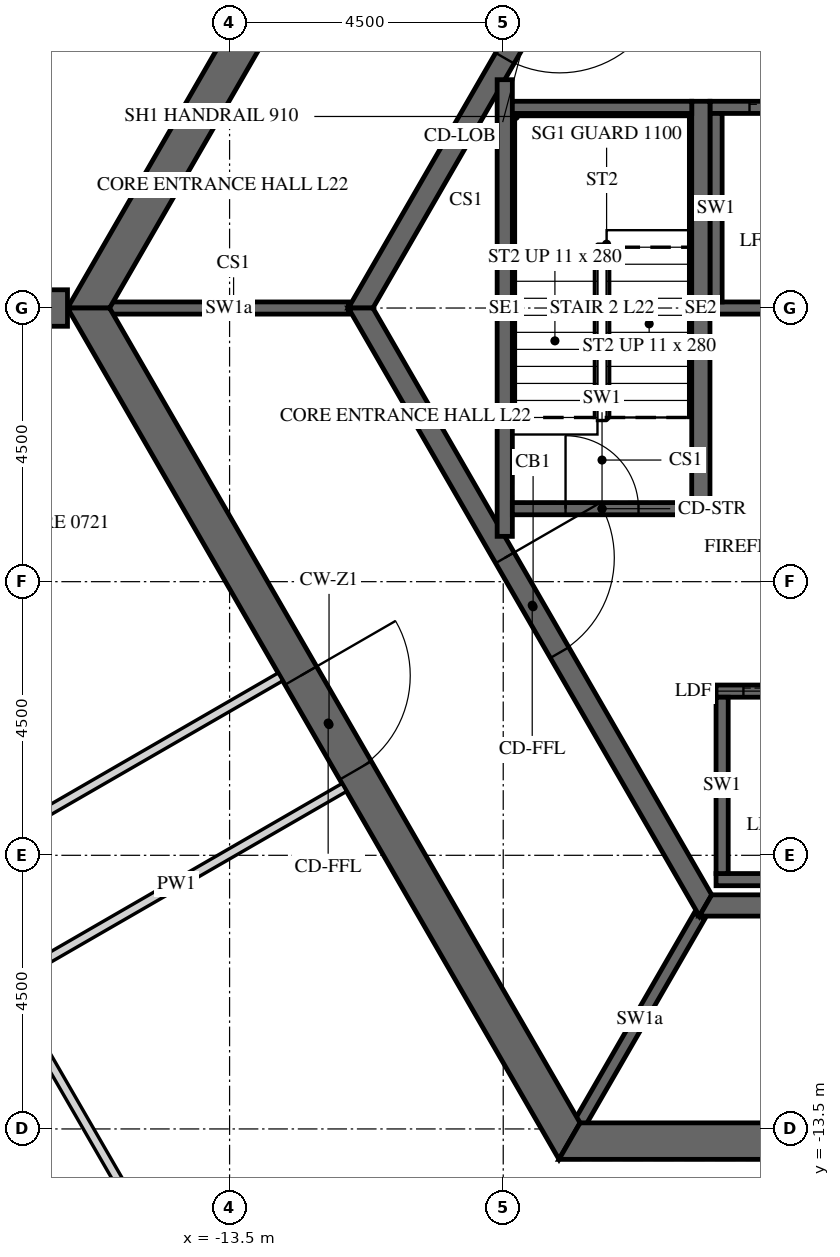
"""IFC4 building model, lengths in metres.
Left out: names, types, materials, properties, quantities, classifications, styles, units other than length and angle.
Written with IfcOpenShell. Run it as: python <this file> out.ifc"""

import sys

from ifc_helpers import new_model, si_unit, direction, frame, frame_2d, origin, place, context, subcontext, project, spatial, polyline, rectangle, outline, extrude, element, fill, save


model = new_model("IFC4")
c1 = context("Model", 3, precision=1e-05, world=origin(), true_north=direction((0.0, 1.0)))
c2 = subcontext(c1, "Body", "Model", "MODEL_VIEW")
j1 = project(units=[si_unit("LENGTHUNIT", "METRE"), si_unit("PLANEANGLEUNIT", "RADIAN")], contexts=[c1])
p1 = place(None, origin())
s1 = spatial("IfcSite", under=j1, at=p1, CompositionType="ELEMENT")
p2 = place(p1, origin())
s2 = spatial("IfcBuilding", under=s1, at=p2, CompositionType="ELEMENT")
p3 = place(p2, frame((0.0, 0.0, 99.9)))
s3 = spatial("IfcBuildingStorey", under=s2, at=p3, CompositionType="ELEMENT", Elevation=99.9)
p4 = place(p3, frame((-7.91, 13.7, -0.15), z_axis=(0.0, 0.0, 1.0), x_axis=(-0.499999880136, -0.866025472988, 0.0)))
e1 = element("IfcWall", 1, at=p4, inside=s3, PredefinedType="SHEAR", context=c2, shape_type="SweptSolid", body=[
    extrude(outline(polyline([(-0.173, -0.3), (15.993, -0.3), (15.646, 0.3), (0.173, 0.3), (-0.173, -0.3)])), origin(), (0.0, 0.0, 1.0), 3.9),
])
p5 = place(p4, frame((7.039, 0.0, 0.15)))
e2 = element("IfcOpeningElement", 2, at=p5, cuts=e1, PredefinedType="OPENING", context=c2, shape_type="SweptSolid", body=[
    extrude(rectangle(XDim=1.8, YDim=2.4, at=frame_2d((0.9, 1.2))), frame((0.0, 0.31, 0.0), z_axis=(0.0, -1.0, 0.0), x_axis=(1.0, 0.0, 0.0)), (0.0, 0.0, 1.0), 0.62),
])
p6 = place(p3, frame((-15.819, 0.0, -0.15), z_axis=(0.0, 0.0, 1.0), x_axis=(0.499999880136, -0.866025472988, 0.0)))
e3 = element("IfcWall", 3, at=p6, inside=s3, PredefinedType="SHEAR", context=c2, shape_type="SweptSolid", body=[
    extrude(outline(polyline([(-0.173, -0.3), (15.993, -0.3), (15.646, 0.3), (0.173, 0.3), (-0.173, -0.3)])), origin(), (0.0, 0.0, 1.0), 3.9),
])
p7 = place(p6, frame((6.981, 0.0, 0.15)))
e4 = element("IfcOpeningElement", 4, at=p7, cuts=e3, PredefinedType="OPENING", context=c2, shape_type="SweptSolid", body=[
    extrude(rectangle(XDim=1.8, YDim=2.4, at=frame_2d((0.9, 1.2))), frame((0.0, 0.31, 0.0), z_axis=(0.0, -1.0, 0.0), x_axis=(1.0, 0.0, 0.0)), (0.0, 0.0, 1.0), 0.62),
])
p8 = place(p3, frame((-7.91, -13.7, -0.15), z_axis=(0.0, 0.0, 1.0), x_axis=(1.0, 0.0, 0.0)))
e5 = element("IfcWall", 5, at=p8, inside=s3, PredefinedType="SHEAR", context=c2, shape_type="SweptSolid", body=[
    extrude(outline(polyline([(-0.173, -0.3), (15.993, -0.3), (15.646, 0.3), (0.173, 0.3), (-0.173, -0.3)])), origin(), (0.0, 0.0, 1.0), 3.9),
])
p9 = place(p8, frame((7.31, 0.0, 0.15)))
e6 = element("IfcOpeningElement", 6, at=p9, cuts=e5, PredefinedType="OPENING", context=c2, shape_type="SweptSolid", body=[
    extrude(rectangle(XDim=1.2, YDim=2.4, at=frame_2d((0.6, 1.2))), frame((0.0, 0.31, 0.0), z_axis=(0.0, -1.0, 0.0), x_axis=(1.0, 0.0, 0.0)), (0.0, 0.0, 1.0), 0.62),
])
p10 = place(p3, frame((-16.166, 0.0, -0.15), z_axis=(0.0, 0.0, 1.0), x_axis=(-1.0, 0.0, 0.0)))
e7 = element("IfcWall", 7, at=p10, inside=s3, PredefinedType="SHEAR", context=c2, shape_type="SweptSolid", body=[
    extrude(rectangle(XDim=16.509, YDim=0.6, at=frame_2d((8.254, 0.0))), origin(), (0.0, 0.0, 1.0), 3.9),
])
p11 = place(p10, frame((7.354, 0.0, 0.15)))
e8 = element("IfcOpeningElement", 8, at=p11, cuts=e7, PredefinedType="OPENING", context=c2, shape_type="SweptSolid", body=[
    extrude(rectangle(XDim=1.8, YDim=2.4, at=frame_2d((0.9, 1.2))), frame((0.0, 0.31, 0.0), z_axis=(0.0, -1.0, 0.0), x_axis=(1.0, 0.0, 0.0)), (0.0, 0.0, 1.0), 0.62),
])
p12 = place(p3, frame((-5.673, 9.825, -0.15), z_axis=(0.0, 0.0, 1.0), x_axis=(-0.499995046907, -0.866028263435, 0.0)))
e9 = element("IfcWall", 9, at=p12, inside=s3, PredefinedType="SHEAR", context=c2, shape_type="SweptSolid", body=[
    extrude(outline(polyline([(-0.101, -0.175), (11.446, -0.175), (11.244, 0.175), (0.101, 0.175), (-0.101, -0.175)])), origin(), (0.0, 0.0, 1.0), 3.9),
])
p13 = place(p12, frame((4.801, 0.0, 0.15)))
e10 = element("IfcOpeningElement", 10, at=p13, cuts=e9, PredefinedType="OPENING", context=c2, shape_type="SweptSolid", body=[
    extrude(rectangle(XDim=1.8, YDim=2.4, at=frame_2d((0.9, 1.2))), frame((0.0, 0.185, 0.0), z_axis=(0.0, -1.0, 0.0), x_axis=(1.0, 0.0, 0.0)), (0.0, 0.0, 1.0), 0.37),
])
p14 = place(p3, frame((-11.345, 0.0, -0.15), z_axis=(0.0, 0.0, 1.0), x_axis=(0.499995046907, -0.866028263435, 0.0)))
e11 = element("IfcWall", 11, at=p14, inside=s3, PredefinedType="SHEAR", context=c2, shape_type="SweptSolid", body=[
    extrude(outline(polyline([(-0.101, -0.175), (11.446, -0.175), (11.244, 0.175), (0.101, 0.175), (-0.101, -0.175)])), origin(), (0.0, 0.0, 1.0), 3.9),
])
p15 = place(p14, frame((4.744, 0.0, 0.15)))
e12 = element("IfcOpeningElement", 12, at=p15, cuts=e11, PredefinedType="OPENING", context=c2, shape_type="SweptSolid", body=[
    extrude(rectangle(XDim=1.8, YDim=2.4, at=frame_2d((0.9, 1.2))), frame((0.0, 0.185, 0.0), z_axis=(0.0, -1.0, 0.0), x_axis=(1.0, 0.0, 0.0)), (0.0, 0.0, 1.0), 0.37),
])
p16 = place(p3, frame((-5.673, -9.825, -0.15), z_axis=(0.0, 0.0, 1.0), x_axis=(1.0, 0.0, 0.0)))
e13 = element("IfcWall", 13, at=p16, inside=s3, PredefinedType="SHEAR", context=c2, shape_type="SweptSolid", body=[
    extrude(outline(polyline([(-0.101, -0.175), (11.446, -0.175), (11.244, 0.175), (0.101, 0.175), (-0.101, -0.175)])), origin(), (0.0, 0.0, 1.0), 3.9),
])
p17 = place(p3, frame((-5.6, 3.3, -0.25), z_axis=(0.0, 0.0, 1.0), x_axis=(1.0, 0.0, 0.0)))
e14 = element("IfcWall", 14, at=p17, inside=s3, PredefinedType="SHEAR", context=c2, shape_type="SweptSolid", body=[
    extrude(rectangle(XDim=11.2, YDim=0.2, at=frame_2d((5.6, 0.0))), origin(), (0.0, 0.0, 1.0), 3.9),
])
p18 = place(p17, frame((0.65, 0.0, 0.25)))
e15 = element("IfcOpeningElement", 15, at=p18, cuts=e14, PredefinedType="OPENING", context=c2, shape_type="SweptSolid", body=[
    extrude(rectangle(XDim=1.1, YDim=2.1, at=frame_2d((0.55, 1.05))), frame((0.0, 0.11, 0.0), z_axis=(0.0, -1.0, 0.0), x_axis=(1.0, 0.0, 0.0)), (0.0, 0.0, 1.0), 0.22),
])
p19 = place(p17, frame((2.85, 0.0, 0.25)))
e16 = element("IfcOpeningElement", 16, at=p19, cuts=e14, PredefinedType="OPENING", context=c2, shape_type="SweptSolid", body=[
    extrude(rectangle(XDim=1.1, YDim=2.1, at=frame_2d((0.55, 1.05))), frame((0.0, 0.11, 0.0), z_axis=(0.0, -1.0, 0.0), x_axis=(1.0, 0.0, 0.0)), (0.0, 0.0, 1.0), 0.22),
])
p20 = place(p17, frame((5.05, 0.0, 0.25)))
e17 = element("IfcOpeningElement", 17, at=p20, cuts=e14, PredefinedType="OPENING", context=c2, shape_type="SweptSolid", body=[
    extrude(rectangle(XDim=1.1, YDim=2.1, at=frame_2d((0.55, 1.05))), frame((0.0, 0.11, 0.0), z_axis=(0.0, -1.0, 0.0), x_axis=(1.0, 0.0, 0.0)), (0.0, 0.0, 1.0), 0.22),
])
p21 = place(p17, frame((7.25, 0.0, 0.25)))
e18 = element("IfcOpeningElement", 18, at=p21, cuts=e14, PredefinedType="OPENING", context=c2, shape_type="SweptSolid", body=[
    extrude(rectangle(XDim=1.1, YDim=2.1, at=frame_2d((0.55, 1.05))), frame((0.0, 0.11, 0.0), z_axis=(0.0, -1.0, 0.0), x_axis=(1.0, 0.0, 0.0)), (0.0, 0.0, 1.0), 0.22),
])
p22 = place(p17, frame((9.45, 0.0, 0.25)))
e19 = element("IfcOpeningElement", 19, at=p22, cuts=e14, PredefinedType="OPENING", context=c2, shape_type="SweptSolid", body=[
    extrude(rectangle(XDim=1.1, YDim=2.1, at=frame_2d((0.55, 1.05))), frame((0.0, 0.11, 0.0), z_axis=(0.0, -1.0, 0.0), x_axis=(1.0, 0.0, 0.0)), (0.0, 0.0, 1.0), 0.22),
])
p23 = place(p3, frame((-5.6, 0.0, -0.25), z_axis=(0.0, 0.0, 1.0), x_axis=(1.0, 0.0, 0.0)))
e20 = element("IfcWall", 20, at=p23, inside=s3, PredefinedType="SHEAR", context=c2, shape_type="SweptSolid", body=[
    extrude(rectangle(XDim=11.2, YDim=0.2, at=frame_2d((5.6, 0.0))), origin(), (0.0, 0.0, 1.0), 3.9),
])
p24 = place(p3, frame((-5.5, 0.1, -0.25), z_axis=(0.0, 0.0, 1.0), x_axis=(0.0, 1.0, 0.0)))
e21 = element("IfcWall", 21, at=p24, inside=s3, PredefinedType="SHEAR", context=c2, shape_type="SweptSolid", body=[
    extrude(rectangle(XDim=3.1, YDim=0.2, at=frame_2d((1.55, 0.0))), origin(), (0.0, 0.0, 1.0), 3.9),
])
p25 = place(p3, frame((-5.5, -6.3, -0.25), z_axis=(0.0, 0.0, 1.0), x_axis=(1.0, 0.0, 0.0)))
e22 = element("IfcWall", 22, at=p25, inside=s3, PredefinedType="SHEAR", context=c2, shape_type="SweptSolid", body=[
    extrude(rectangle(XDim=9.2, YDim=0.2, at=frame_2d((4.6, 0.0))), origin(), (0.0, 0.0, 1.0), 3.9),
])
p26 = place(p25, frame((0.45, 0.0, 0.25)))
e23 = element("IfcOpeningElement", 23, at=p26, cuts=e22, PredefinedType="OPENING", context=c2, shape_type="SweptSolid", body=[
    extrude(rectangle(XDim=1.1, YDim=2.1, at=frame_2d((0.55, 1.05))), frame((0.0, 0.11, 0.0), z_axis=(0.0, -1.0, 0.0), x_axis=(1.0, 0.0, 0.0)), (0.0, 0.0, 1.0), 0.22),
])
p27 = place(p25, frame((2.25, 0.0, 0.25)))
e24 = element("IfcOpeningElement", 24, at=p27, cuts=e22, PredefinedType="OPENING", context=c2, shape_type="SweptSolid", body=[
    extrude(rectangle(XDim=1.1, YDim=2.1, at=frame_2d((0.55, 1.05))), frame((0.0, 0.11, 0.0), z_axis=(0.0, -1.0, 0.0), x_axis=(1.0, 0.0, 0.0)), (0.0, 0.0, 1.0), 0.22),
])
p28 = place(p25, frame((4.05, 0.0, 0.25)))
e25 = element("IfcOpeningElement", 25, at=p28, cuts=e22, PredefinedType="OPENING", context=c2, shape_type="SweptSolid", body=[
    extrude(rectangle(XDim=1.1, YDim=2.1, at=frame_2d((0.55, 1.05))), frame((0.0, 0.11, 0.0), z_axis=(0.0, -1.0, 0.0), x_axis=(1.0, 0.0, 0.0)), (0.0, 0.0, 1.0), 0.22),
])
p29 = place(p25, frame((5.85, 0.0, 0.25)))
e26 = element("IfcOpeningElement", 26, at=p29, cuts=e22, PredefinedType="OPENING", context=c2, shape_type="SweptSolid", body=[
    extrude(rectangle(XDim=1.1, YDim=2.1, at=frame_2d((0.55, 1.05))), frame((0.0, 0.11, 0.0), z_axis=(0.0, -1.0, 0.0), x_axis=(1.0, 0.0, 0.0)), (0.0, 0.0, 1.0), 0.22),
])
p30 = place(p25, frame((7.65, 0.0, 0.25)))
e27 = element("IfcOpeningElement", 27, at=p30, cuts=e22, PredefinedType="OPENING", context=c2, shape_type="SweptSolid", body=[
    extrude(rectangle(XDim=1.1, YDim=2.1, at=frame_2d((0.55, 1.05))), frame((0.0, 0.11, 0.0), z_axis=(0.0, -1.0, 0.0), x_axis=(1.0, 0.0, 0.0)), (0.0, 0.0, 1.0), 0.22),
])
p31 = place(p3, frame((-5.5, -9.4, -0.25), z_axis=(0.0, 0.0, 1.0), x_axis=(1.0, 0.0, 0.0)))
e28 = element("IfcWall", 28, at=p31, inside=s3, PredefinedType="SHEAR", context=c2, shape_type="SweptSolid", body=[
    extrude(rectangle(XDim=9.2, YDim=0.2, at=frame_2d((4.6, 0.0))), origin(), (0.0, 0.0, 1.0), 3.9),
])
p32 = place(p3, frame((-5.4, -9.3, -0.25), z_axis=(0.0, 0.0, 1.0), x_axis=(0.0, 1.0, 0.0)))
e29 = element("IfcWall", 29, at=p32, inside=s3, PredefinedType="SHEAR", context=c2, shape_type="SweptSolid", body=[
    extrude(rectangle(XDim=2.9, YDim=0.2, at=frame_2d((1.45, 0.0))), origin(), (0.0, 0.0, 1.0), 3.9),
])
p33 = place(p3, frame((-11.547, 0.0, -0.15), z_axis=(0.0, 0.0, 1.0), x_axis=(-1.0, 0.0, 0.0)))
e30 = element("IfcWall", 30, at=p33, inside=s3, PredefinedType="SHEAR", context=c2, shape_type="SweptSolid", body=[
    extrude(rectangle(XDim=3.926, YDim=0.2, at=frame_2d((1.963, 0.0))), origin(), (0.0, 0.0, 1.0), 3.9),
])
p34 = place(p3, frame((-5.773, -10.0, -0.15), z_axis=(0.0, 0.0, 1.0), x_axis=(-0.500038251005, -0.86600331843, 0.0)))
e31 = element("IfcWall", 31, at=p34, inside=s3, PredefinedType="SHEAR", context=c2, shape_type="SweptSolid", body=[
    extrude(rectangle(XDim=3.926, YDim=0.2, at=frame_2d((1.963, 0.0))), origin(), (0.0, 0.0, 1.0), 3.9),
])
p35 = place(p3, frame((-5.75, -3.4, -0.25), z_axis=(0.0, 0.0, 1.0), x_axis=(0.0, 1.0, 0.0)))
e32 = element("IfcWall", 32, at=p35, inside=s3, PredefinedType="SHEAR", context=c2, shape_type="SweptSolid", body=[
    extrude(rectangle(XDim=6.8, YDim=0.3, at=frame_2d((3.4, 0.0))), origin(), (0.0, 0.0, 1.0), 3.9),
])
p36 = place(p3, frame((-8.975, -3.755, -0.25), z_axis=(0.0, 0.0, 1.0), x_axis=(0.0, 1.0, 0.0)))
e33 = element("IfcWall", 33, at=p36, inside=s3, PredefinedType="SHEAR", context=c2, shape_type="SweptSolid", body=[
    extrude(rectangle(XDim=7.51, YDim=0.25, at=frame_2d((3.755, 0.0))), origin(), (0.0, 0.0, 1.0), 3.9),
])
p37 = place(p3, frame((-8.85, 3.3, -0.25), z_axis=(0.0, 0.0, 1.0), x_axis=(1.0, 0.0, 0.0)))
e34 = element("IfcWall", 34, at=p37, inside=s3, PredefinedType="SHEAR", context=c2, shape_type="SweptSolid", body=[
    extrude(rectangle(XDim=2.95, YDim=0.2, at=frame_2d((1.475, 0.0))), origin(), (0.0, 0.0, 1.0), 3.9),
])
p38 = place(p3, frame((-8.85, -3.3, -0.25), z_axis=(0.0, 0.0, 1.0), x_axis=(1.0, 0.0, 0.0)))
e35 = element("IfcWall", 35, at=p38, inside=s3, PredefinedType="SHEAR", context=c2, shape_type="SweptSolid", body=[
    extrude(rectangle(XDim=2.95, YDim=0.2, at=frame_2d((1.475, 0.0))), origin(), (0.0, 0.0, 1.0), 3.9),
])
p39 = place(p38, frame((0.875, 0.0, 0.25)))
e36 = element("IfcOpeningElement", 36, at=p39, cuts=e35, PredefinedType="OPENING", context=c2, shape_type="SweptSolid", body=[
    extrude(rectangle(XDim=1.2, YDim=2.4, at=frame_2d((0.6, 1.2))), frame((0.0, 0.11, 0.0), z_axis=(0.0, -1.0, 0.0), x_axis=(1.0, 0.0, 0.0)), (0.0, 0.0, 1.0), 0.22),
])
p40 = place(p3, frame((-13.94, 22.175, 0.0), z_axis=(0.0, 0.0, 1.0), x_axis=(-0.438373022655, -0.898793131376, 0.0)))
e37 = element("IfcWall", 37, at=p40, inside=s3, PredefinedType="PARTITIONING", context=c2, shape_type="SweptSolid", body=[
    extrude(rectangle(XDim=22.335, YDim=0.15, at=frame_2d((11.168, 0.0))), origin(), (0.0, 0.0, 1.0), 2.988),
])
p41 = place(p40, frame((3.363, 0.0, 0.0)))
e38 = element("IfcOpeningElement", 38, at=p41, cuts=e37, PredefinedType="OPENING", context=c2, shape_type="SweptSolid", body=[
    extrude(rectangle(XDim=1.0, YDim=2.1, at=frame_2d((0.5, 1.05))), frame((0.0, 0.085, 0.0), z_axis=(0.0, -1.0, 0.0), x_axis=(1.0, 0.0, 0.0)), (0.0, 0.0, 1.0), 0.17),
])
p42 = place(p40, frame((11.609, 0.0, 0.0)))
e39 = element("IfcOpeningElement", 39, at=p42, cuts=e37, PredefinedType="OPENING", context=c2, shape_type="SweptSolid", body=[
    extrude(rectangle(XDim=1.0, YDim=2.1, at=frame_2d((0.5, 1.05))), frame((0.0, 0.085, 0.0), z_axis=(0.0, -1.0, 0.0), x_axis=(1.0, 0.0, 0.0)), (0.0, 0.0, 1.0), 0.17),
])
p43 = place(p40, frame((19.872, 0.0, 0.0)))
e40 = element("IfcOpeningElement", 40, at=p43, cuts=e37, PredefinedType="OPENING", context=c2, shape_type="SweptSolid", body=[
    extrude(rectangle(XDim=1.0, YDim=2.1, at=frame_2d((0.5, 1.05))), frame((0.0, 0.085, 0.0), z_axis=(0.0, -1.0, 0.0), x_axis=(1.0, 0.0, 0.0)), (0.0, 0.0, 1.0), 0.17),
])
p44 = place(p3, frame((-24.436, -2.175, 0.0), z_axis=(0.0, 0.0, 1.0), x_axis=(0.499996816197, -0.866027241946, 0.0)))
e41 = element("IfcWall", 41, at=p44, inside=s3, PredefinedType="PARTITIONING", context=c2, shape_type="SweptSolid", body=[
    extrude(rectangle(XDim=24.238, YDim=0.15, at=frame_2d((12.119, 0.0))), origin(), (0.0, 0.0, 1.0), 2.988),
])
p45 = place(p44, frame((0.179, 0.0, 0.0)))
e42 = element("IfcOpeningElement", 42, at=p45, cuts=e41, PredefinedType="OPENING", context=c2, shape_type="SweptSolid", body=[
    extrude(rectangle(XDim=1.0, YDim=2.1, at=frame_2d((0.5, 1.05))), frame((0.0, 0.085, 0.0), z_axis=(0.0, -1.0, 0.0), x_axis=(1.0, 0.0, 0.0)), (0.0, 0.0, 1.0), 0.17),
])
p46 = place(p44, frame((12.246, 0.0, 0.0)))
e43 = element("IfcOpeningElement", 43, at=p46, cuts=e41, PredefinedType="OPENING", context=c2, shape_type="SweptSolid", body=[
    extrude(rectangle(XDim=1.0, YDim=2.1, at=frame_2d((0.5, 1.05))), frame((0.0, 0.085, 0.0), z_axis=(0.0, -1.0, 0.0), x_axis=(1.0, 0.0, 0.0)), (0.0, 0.0, 1.0), 0.17),
])
p47 = place(p44, frame((19.792, 0.0, 0.0)))
e44 = element("IfcOpeningElement", 44, at=p47, cuts=e41, PredefinedType="OPENING", context=c2, shape_type="SweptSolid", body=[
    extrude(rectangle(XDim=1.0, YDim=2.1, at=frame_2d((0.5, 1.05))), frame((0.0, 0.085, 0.0), z_axis=(0.0, -1.0, 0.0), x_axis=(1.0, 0.0, 0.0)), (0.0, 0.0, 1.0), 0.17),
])
p48 = place(p3, frame((-12.664, -6.066, 0.0), z_axis=(0.0, 0.0, 1.0), x_axis=(-0.866021702275, -0.500006411147, 0.0)))
e45 = element("IfcWall", 45, at=p48, inside=s3, PredefinedType="PARTITIONING", context=c2, shape_type="SweptSolid", body=[
    extrude(rectangle(XDim=6.45, YDim=0.15, at=frame_2d((3.225, 0.0))), origin(), (0.0, 0.0, 1.0), 2.988),
])
p49 = place(p3, frame((-11.363, -21.219, 0.0), z_axis=(0.0, 0.0, 1.0), x_axis=(-0.50001451402, 0.866017023949, 0.0)))
e46 = element("IfcWall", 46, at=p49, inside=s3, PredefinedType="PARTITIONING", context=c2, shape_type="SweptSolid", body=[
    extrude(rectangle(XDim=11.674, YDim=0.15, at=frame_2d((5.837, 0.0))), origin(), (0.0, 0.0, 1.0), 2.988),
])
p50 = place(p49, frame((5.387, 0.0, 0.0)))
e47 = element("IfcOpeningElement", 47, at=p50, cuts=e46, PredefinedType="OPENING", context=c2, shape_type="SweptSolid", body=[
    extrude(rectangle(XDim=0.9, YDim=2.1, at=frame_2d((0.45, 1.05))), frame((0.0, 0.085, 0.0), z_axis=(0.0, -1.0, 0.0), x_axis=(1.0, 0.0, 0.0)), (0.0, 0.0, 1.0), 0.17),
])
p51 = place(p3, frame((-17.135, -11.072, 0.0), z_axis=(0.0, 0.0, 1.0), x_axis=(0.866028703517, 0.499994284652, 0.0)))
e48 = element("IfcWall", 48, at=p51, inside=s3, PredefinedType="PARTITIONING", context=c2, shape_type="SweptSolid", body=[
    extrude(rectangle(XDim=6.375, YDim=0.15, at=frame_2d((3.188, 0.0))), origin(), (0.0, 0.0, 1.0), 2.988),
])
p52 = place(p7, origin())
e49 = element("IfcDoor", 49, at=p52, inside=s3, OperationType="DOUBLE_DOOR_SINGLE_SWING", PredefinedType="DOOR", context=c2, shape_type="SweptSolid", body=[
    extrude(rectangle(XDim=1.8, YDim=2.4, at=frame_2d((0.9, 1.2))), frame((0.0, 0.025, 0.0), z_axis=(0.0, -1.0, 0.0), x_axis=(1.0, 0.0, 0.0)), (0.0, 0.0, 1.0), 0.05),
])
fill(e4, e49)
p53 = place(p13, origin())
e50 = element("IfcDoor", 50, at=p53, inside=s3, OperationType="DOUBLE_DOOR_SINGLE_SWING", PredefinedType="DOOR", context=c2, shape_type="SweptSolid", body=[
    extrude(rectangle(XDim=1.8, YDim=2.4, at=frame_2d((0.9, 1.2))), frame((0.0, 0.025, 0.0), z_axis=(0.0, -1.0, 0.0), x_axis=(1.0, 0.0, 0.0)), (0.0, 0.0, 1.0), 0.05),
])
fill(e10, e50)
p54 = place(p15, origin())
e51 = element("IfcDoor", 51, at=p54, inside=s3, OperationType="DOUBLE_DOOR_SINGLE_SWING", PredefinedType="DOOR", context=c2, shape_type="SweptSolid", body=[
    extrude(rectangle(XDim=1.8, YDim=2.4, at=frame_2d((0.9, 1.2))), frame((0.0, 0.025, 0.0), z_axis=(0.0, -1.0, 0.0), x_axis=(1.0, 0.0, 0.0)), (0.0, 0.0, 1.0), 0.05),
])
fill(e12, e51)
p55 = place(p39, origin())
e52 = element("IfcDoor", 52, at=p55, inside=s3, OperationType="SINGLE_SWING_LEFT", PredefinedType="DOOR", context=c2, shape_type="SweptSolid", body=[
    extrude(rectangle(XDim=1.2, YDim=2.4, at=frame_2d((0.6, 1.2))), frame((0.0, 0.025, 0.0), z_axis=(0.0, -1.0, 0.0), x_axis=(1.0, 0.0, 0.0)), (0.0, 0.0, 1.0), 0.05),
])
fill(e36, e52)
p56 = place(p18, origin())
e53 = element("IfcDoor", 53, at=p56, inside=s3, OperationType="SLIDING_TO_LEFT", PredefinedType="DOOR", context=c2, shape_type="SweptSolid", body=[
    extrude(rectangle(XDim=1.1, YDim=2.1, at=frame_2d((0.55, 1.05))), frame((0.0, 0.025, 0.0), z_axis=(0.0, -1.0, 0.0), x_axis=(1.0, 0.0, 0.0)), (0.0, 0.0, 1.0), 0.05),
])
fill(e15, e53)
p57 = place(p26, origin())
e54 = element("IfcDoor", 54, at=p57, inside=s3, OperationType="SLIDING_TO_LEFT", PredefinedType="DOOR", context=c2, shape_type="SweptSolid", body=[
    extrude(rectangle(XDim=1.1, YDim=2.1, at=frame_2d((0.55, 1.05))), frame((0.0, 0.025, 0.0), z_axis=(0.0, -1.0, 0.0), x_axis=(1.0, 0.0, 0.0)), (0.0, 0.0, 1.0), 0.05),
])
fill(e23, e54)
save(model, sys.argv[1])
